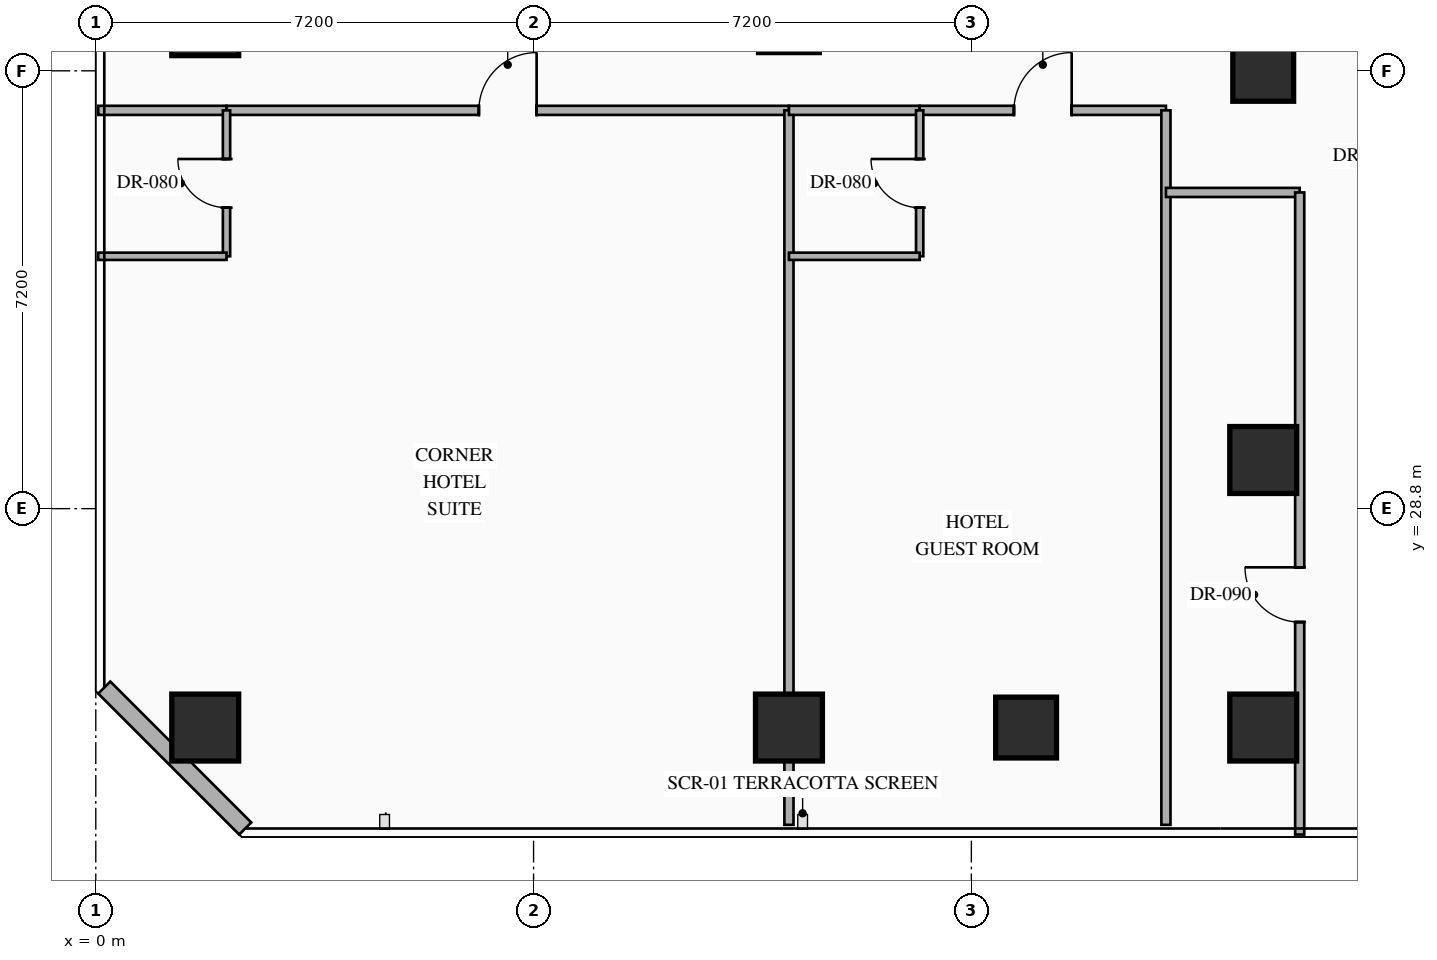
"""IFC4 building model, lengths in metres.
Left out: names, types, materials, properties, quantities, classifications, styles, units other than length and angle.
Written with IfcOpenShell. Run it as: python <this file> out.ifc"""

import sys

from ifc_helpers import new_model, si_unit, direction, frame, frame_2d, origin, origin_2d, place, context, subcontext, project, spatial, rectangle, hollow_rectangle, extrude, element, fill, save


model = new_model("IFC4")
c1 = context("Model", 3, precision=1e-05, world=origin(), true_north=direction((0.0, 1.0)))
c2 = subcontext(c1, "Body", "Model", "MODEL_VIEW")
j1 = project(units=[si_unit("LENGTHUNIT", "METRE"), si_unit("PLANEANGLEUNIT", "RADIAN")], contexts=[c1])
p1 = place(None, origin())
s1 = spatial("IfcSite", under=j1, at=p1, CompositionType="ELEMENT")
p2 = place(p1, origin())
s2 = spatial("IfcBuilding", under=s1, at=p2, CompositionType="ELEMENT")
p3 = place(p2, frame((0.0, 0.0, 66.75)))
s3 = spatial("IfcBuildingStorey", under=s2, at=p3, CompositionType="ELEMENT", Elevation=66.75)
for number, where, z_axis, x_axis in (
    (1, (1.8, 25.2, 0.0), (0.0, 0.0, 1.0), (1.0, 0.0, 0.0)),
    (2, (1.8, 36.8, 0.0), (0.0, 0.0, 1.0), (1.0, 0.0, 0.0)),
):
    element("IfcColumn", number, at=place(p3, frame(where, z_axis=z_axis, x_axis=x_axis)), inside=s3, PredefinedType="COLUMN", context=c2, shape_type="SweptSolid", body=[
        extrude(hollow_rectangle(XDim=1.1, YDim=1.1, WallThickness=0.04, at=origin_2d()), origin(), (0.0, 0.0, 1.0), 3.098),
    ])
for number, where, z_axis, x_axis in (
    (3, (11.4, 25.2, 0.0), (0.0, 0.0, 1.0), (1.0, 0.0, 0.0)),
    (4, (19.2, 25.2, 0.0), (0.0, 0.0, 1.0), (1.0, 0.0, 0.0)),
    (5, (19.2, 29.6, 0.0), (0.0, 0.0, 1.0), (1.0, 0.0, 0.0)),
):
    element("IfcColumn", number, at=place(p3, frame(where, z_axis=z_axis, x_axis=x_axis)), inside=s3, PredefinedType="COLUMN", context=c2, shape_type="SweptSolid", body=[
        extrude(hollow_rectangle(XDim=1.1, YDim=1.1, WallThickness=0.04, at=origin_2d()), origin(), (0.0, 0.0, 1.0), 3.35),
    ])
for number, where, z_axis, x_axis in (
    (6, (19.2, 36.0, 0.0), (0.0, 0.0, 1.0), (1.0, 0.0, 0.0)),
    (7, (15.3, 25.2, 0.0), (0.0, 0.0, 1.0), (1.0, 0.0, 0.0)),
):
    element("IfcColumn", number, at=place(p3, frame(where, z_axis=z_axis, x_axis=x_axis)), inside=s3, PredefinedType="COLUMN", context=c2, shape_type="SweptSolid", body=[
        extrude(hollow_rectangle(XDim=1.0, YDim=1.0, WallThickness=0.038, at=origin_2d()), origin(), (0.0, 0.0, 1.0), 3.35),
    ])
p4 = place(p3, frame((2.458, 23.54, 0.0), z_axis=(0.0, 0.0, 1.0), x_axis=(-0.707144017911, 0.707069542501, 0.0)))
e8 = element("IfcWall", 8, at=p4, inside=s3, PredefinedType="STANDARD", context=c2, shape_type="SweptSolid", body=[
    extrude(rectangle(XDim=3.278, YDim=0.28, at=frame_2d((1.639, 0.0))), origin(), (0.0, 0.0, 1.0), 3.09),
])
p5 = place(p3, frame((0.04, 35.35, 0.0), z_axis=(0.0, 0.0, 1.0), x_axis=(1.0, 0.0, 0.0)))
e9 = element("IfcWall", 9, at=p5, inside=s3, PredefinedType="PARTITIONING", context=c2, shape_type="SweptSolid", body=[
    extrude(rectangle(XDim=2.11, YDim=0.15, at=frame_2d((1.055, 0.0))), origin(), (0.0, 0.0, 1.0), 3.09),
])
p6 = place(p3, frame((2.15, 35.35, 0.0), z_axis=(0.0, 0.0, 1.0), x_axis=(1.0, 0.0, 0.0)))
e10 = element("IfcWall", 10, at=p6, inside=s3, PredefinedType="PARTITIONING", context=c2, shape_type="SweptSolid", body=[
    extrude(rectangle(XDim=9.25, YDim=0.15, at=frame_2d((4.625, 0.0))), origin(), (0.0, 0.0, 1.0), 3.09),
])
p7 = place(p6, frame((4.15, 0.0, 0.0)))
e11 = element("IfcOpeningElement", 11, at=p7, cuts=e10, PredefinedType="OPENING", context=c2, shape_type="SweptSolid", body=[
    extrude(rectangle(XDim=0.95, YDim=2.15, at=frame_2d((0.475, 1.075))), frame((0.0, 0.085, 0.0), z_axis=(0.0, -1.0, 0.0), x_axis=(1.0, 0.0, 0.0)), (0.0, 0.0, 1.0), 0.17),
])
p8 = place(p3, frame((2.15, 32.95, 0.0), z_axis=(0.0, 0.0, 1.0), x_axis=(0.0, 1.0, 0.0)))
e12 = element("IfcWall", 12, at=p8, inside=s3, PredefinedType="PARTITIONING", context=c2, shape_type="SweptSolid", body=[
    extrude(rectangle(XDim=2.4, YDim=0.12, at=frame_2d((1.2, 0.0))), origin(), (0.0, 0.0, 1.0), 3.09),
])
p9 = place(p8, frame((0.8, 0.0, 0.0)))
e13 = element("IfcOpeningElement", 13, at=p9, cuts=e12, PredefinedType="OPENING", context=c2, shape_type="SweptSolid", body=[
    extrude(rectangle(XDim=0.8, YDim=2.06, at=frame_2d((0.4, 1.03))), frame((0.0, 0.07, 0.0), z_axis=(0.0, -1.0, 0.0), x_axis=(1.0, 0.0, 0.0)), (0.0, 0.0, 1.0), 0.14),
])
p10 = place(p3, frame((0.04, 32.95, 0.0), z_axis=(0.0, 0.0, 1.0), x_axis=(1.0, 0.0, 0.0)))
e14 = element("IfcWall", 14, at=p10, inside=s3, PredefinedType="PARTITIONING", context=c2, shape_type="SweptSolid", body=[
    extrude(rectangle(XDim=2.11, YDim=0.12, at=frame_2d((1.055, 0.0))), origin(), (0.0, 0.0, 1.0), 3.09),
])
p11 = place(p3, frame((11.4, 23.6, 0.0), z_axis=(0.0, 0.0, 1.0), x_axis=(0.0, 1.0, 0.0)))
e15 = element("IfcWall", 15, at=p11, inside=s3, PredefinedType="PARTITIONING", context=c2, shape_type="SweptSolid", body=[
    extrude(rectangle(XDim=11.75, YDim=0.15, at=frame_2d((5.875, 0.0))), origin(), (0.0, 0.0, 1.0), 2.425),
])
p12 = place(p3, frame((11.4, 35.35, 0.0), z_axis=(0.0, 0.0, 1.0), x_axis=(1.0, 0.0, 0.0)))
e16 = element("IfcWall", 16, at=p12, inside=s3, PredefinedType="PARTITIONING", context=c2, shape_type="SweptSolid", body=[
    extrude(rectangle(XDim=2.15, YDim=0.15, at=frame_2d((1.075, 0.0))), origin(), (0.0, 0.0, 1.0), 3.09),
])
p13 = place(p3, frame((13.55, 35.35, 0.0), z_axis=(0.0, 0.0, 1.0), x_axis=(1.0, 0.0, 0.0)))
e17 = element("IfcWall", 17, at=p13, inside=s3, PredefinedType="PARTITIONING", context=c2, shape_type="SweptSolid", body=[
    extrude(rectangle(XDim=4.05, YDim=0.15, at=frame_2d((2.025, 0.0))), origin(), (0.0, 0.0, 1.0), 3.09),
])
p14 = place(p13, frame((1.55, 0.0, 0.0)))
e18 = element("IfcOpeningElement", 18, at=p14, cuts=e17, PredefinedType="OPENING", context=c2, shape_type="SweptSolid", body=[
    extrude(rectangle(XDim=0.95, YDim=2.15, at=frame_2d((0.475, 1.075))), frame((0.0, 0.085, 0.0), z_axis=(0.0, -1.0, 0.0), x_axis=(1.0, 0.0, 0.0)), (0.0, 0.0, 1.0), 0.17),
])
p15 = place(p3, frame((13.55, 32.95, 0.0), z_axis=(0.0, 0.0, 1.0), x_axis=(0.0, 1.0, 0.0)))
e19 = element("IfcWall", 19, at=p15, inside=s3, PredefinedType="PARTITIONING", context=c2, shape_type="SweptSolid", body=[
    extrude(rectangle(XDim=2.4, YDim=0.12, at=frame_2d((1.2, 0.0))), origin(), (0.0, 0.0, 1.0), 3.09),
])
p16 = place(p15, frame((0.8, 0.0, 0.0)))
e20 = element("IfcOpeningElement", 20, at=p16, cuts=e19, PredefinedType="OPENING", context=c2, shape_type="SweptSolid", body=[
    extrude(rectangle(XDim=0.8, YDim=2.06, at=frame_2d((0.4, 1.03))), frame((0.0, 0.07, 0.0), z_axis=(0.0, -1.0, 0.0), x_axis=(1.0, 0.0, 0.0)), (0.0, 0.0, 1.0), 0.14),
])
p17 = place(p3, frame((11.4, 32.95, 0.0), z_axis=(0.0, 0.0, 1.0), x_axis=(1.0, 0.0, 0.0)))
e21 = element("IfcWall", 21, at=p17, inside=s3, PredefinedType="PARTITIONING", context=c2, shape_type="SweptSolid", body=[
    extrude(rectangle(XDim=2.15, YDim=0.12, at=frame_2d((1.075, 0.0))), origin(), (0.0, 0.0, 1.0), 3.09),
])
p18 = place(p3, frame((17.6, 23.6, 0.0), z_axis=(0.0, 0.0, 1.0), x_axis=(0.0, 1.0, 0.0)))
e22 = element("IfcWall", 22, at=p18, inside=s3, PredefinedType="PARTITIONING", context=c2, shape_type="SweptSolid", body=[
    extrude(rectangle(XDim=11.75, YDim=0.15, at=frame_2d((5.875, 0.0))), origin(), (0.0, 0.0, 1.0), 3.09),
])
p19 = place(p3, frame((17.6, 34.0, 0.0), z_axis=(0.0, 0.0, 1.0), x_axis=(1.0, 0.0, 0.0)))
e23 = element("IfcWall", 23, at=p19, inside=s3, PredefinedType="PARTITIONING", context=c2, shape_type="SweptSolid", body=[
    extrude(rectangle(XDim=2.2, YDim=0.15, at=frame_2d((1.1, 0.0))), origin(), (0.0, 0.0, 1.0), 3.09),
])
p20 = place(p3, frame((19.8, 23.44, 0.0), z_axis=(0.0, 0.0, 1.0), x_axis=(0.0, 1.0, 0.0)))
e24 = element("IfcWall", 24, at=p20, inside=s3, PredefinedType="PARTITIONING", context=c2, shape_type="SweptSolid", body=[
    extrude(rectangle(XDim=10.56, YDim=0.15, at=frame_2d((5.28, 0.0))), origin(), (0.0, 0.0, 1.0), 3.09),
])
p21 = place(p20, frame((3.495, 0.0, 0.0)))
e25 = element("IfcOpeningElement", 25, at=p21, cuts=e24, PredefinedType="OPENING", context=c2, shape_type="SweptSolid", body=[
    extrude(rectangle(XDim=0.9, YDim=2.15, at=frame_2d((0.45, 1.075))), frame((0.0, 0.085, 0.0), z_axis=(0.0, -1.0, 0.0), x_axis=(1.0, 0.0, 0.0)), (0.0, 0.0, 1.0), 0.17),
])
p22 = place(p7, origin())
e26 = element("IfcDoor", 26, at=p22, inside=s3, OperationType="SINGLE_SWING_RIGHT", PredefinedType="DOOR", context=c2, shape_type="SweptSolid", body=[
    extrude(rectangle(XDim=0.95, YDim=2.15, at=frame_2d((0.475, 1.075))), frame((0.0, 0.025, 0.0), z_axis=(0.0, -1.0, 0.0), x_axis=(1.0, 0.0, 0.0)), (0.0, 0.0, 1.0), 0.05),
])
fill(e11, e26)
p23 = place(p9, origin())
e27 = element("IfcDoor", 27, at=p23, inside=s3, OperationType="SINGLE_SWING_RIGHT", PredefinedType="DOOR", context=c2, shape_type="SweptSolid", body=[
    extrude(rectangle(XDim=0.8, YDim=2.06, at=frame_2d((0.4, 1.03))), frame((0.0, 0.025, 0.0), z_axis=(0.0, -1.0, 0.0), x_axis=(1.0, 0.0, 0.0)), (0.0, 0.0, 1.0), 0.05),
])
fill(e13, e27)
p24 = place(p14, origin())
e28 = element("IfcDoor", 28, at=p24, inside=s3, OperationType="SINGLE_SWING_RIGHT", PredefinedType="DOOR", context=c2, shape_type="SweptSolid", body=[
    extrude(rectangle(XDim=0.95, YDim=2.15, at=frame_2d((0.475, 1.075))), frame((0.0, 0.025, 0.0), z_axis=(0.0, -1.0, 0.0), x_axis=(1.0, 0.0, 0.0)), (0.0, 0.0, 1.0), 0.05),
])
fill(e18, e28)
p25 = place(p16, origin())
e29 = element("IfcDoor", 29, at=p25, inside=s3, OperationType="SINGLE_SWING_RIGHT", PredefinedType="DOOR", context=c2, shape_type="SweptSolid", body=[
    extrude(rectangle(XDim=0.8, YDim=2.06, at=frame_2d((0.4, 1.03))), frame((0.0, 0.025, 0.0), z_axis=(0.0, -1.0, 0.0), x_axis=(1.0, 0.0, 0.0)), (0.0, 0.0, 1.0), 0.05),
])
fill(e20, e29)
p26 = place(p21, origin())
e30 = element("IfcDoor", 30, at=p26, inside=s3, OperationType="SINGLE_SWING_RIGHT", PredefinedType="DOOR", context=c2, shape_type="SweptSolid", body=[
    extrude(rectangle(XDim=0.9, YDim=2.15, at=frame_2d((0.45, 1.075))), frame((0.0, 0.025, 0.0), z_axis=(0.0, -1.0, 0.0), x_axis=(1.0, 0.0, 0.0)), (0.0, 0.0, 1.0), 0.05),
])
fill(e25, e30)
save(model, sys.argv[1])
